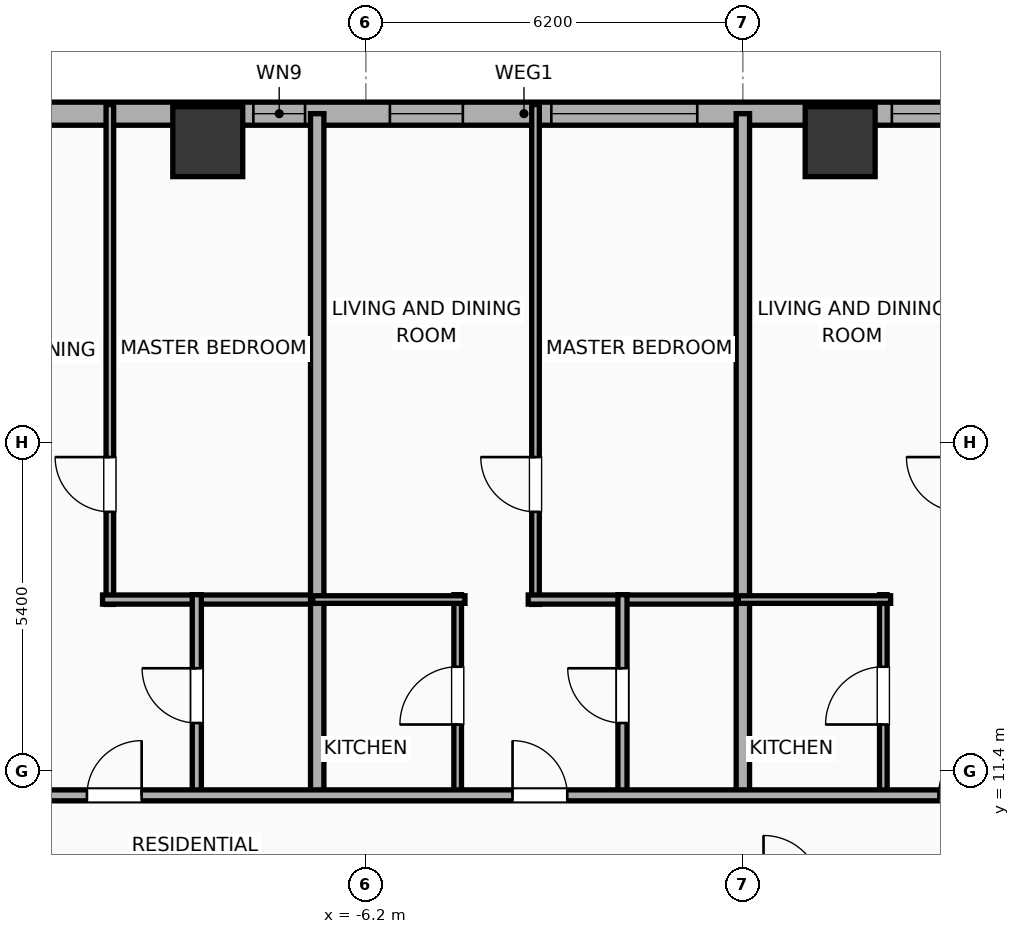
"""IFC4 building model, lengths in metres.
Left out: names, types, materials, properties, quantities, classifications, styles, units other than length and angle.
Written with IfcOpenShell. Run it as: python <this file> out.ifc"""

import sys

from ifc_helpers import new_model, si_unit, direction, frame, frame_2d, origin, origin_2d, place, context, subcontext, project, spatial, rectangle, hollow_rectangle, extrude, element, fill, save


model = new_model("IFC4")
c1 = context("Model", 3, precision=1e-05, world=origin(), true_north=direction((0.0, 1.0)))
c2 = subcontext(c1, "Body", "Model", "MODEL_VIEW")
j1 = project(units=[si_unit("LENGTHUNIT", "METRE"), si_unit("PLANEANGLEUNIT", "RADIAN")], contexts=[c1])
p1 = place(None, origin())
s1 = spatial("IfcSite", under=j1, at=p1, CompositionType="ELEMENT")
p2 = place(p1, origin())
s2 = spatial("IfcBuilding", under=s1, at=p2, CompositionType="ELEMENT")
p3 = place(p2, frame((0.0, 0.0, 65.0)))
s3 = spatial("IfcBuildingStorey", under=s2, at=p3, CompositionType="ELEMENT", Elevation=65.0)
for number, where, z_axis, x_axis in (
    (1, (1.6, 21.75, 0.0), (0.0, 0.0, 1.0), (1.0, 0.0, 0.0)),
    (2, (-8.8, 21.75, 0.0), (0.0, 0.0, 1.0), (1.0, 0.0, 0.0)),
):
    element("IfcColumn", number, at=place(p3, frame(where, z_axis=z_axis, x_axis=x_axis)), inside=s3, PredefinedType="COLUMN", context=c2, shape_type="SweptSolid", body=[
        extrude(hollow_rectangle(XDim=1.15, YDim=1.15, WallThickness=0.04, at=origin_2d()), origin(), (0.0, 0.0, 1.0), 3.9),
    ])
p4 = place(p3, frame((-29.581, 22.21, 0.0), z_axis=(0.0, 0.0, 1.0), x_axis=(1.0, 0.0, 0.0)))
e3 = element("IfcWall", 3, at=p4, inside=s3, PredefinedType="ELEMENTEDWALL", context=c2, shape_type="SweptSolid", body=[
    extrude(rectangle(XDim=51.963, YDim=0.38, at=frame_2d((25.981, 0.0))), origin(), (0.0, 0.0, 1.0), 3.65),
])
p5 = place(p4, frame((5.81, 0.0, 0.75)))
e4 = element("IfcOpeningElement", 4, at=p5, cuts=e3, PredefinedType="OPENING", context=c2, shape_type="SweptSolid", body=[
    extrude(rectangle(XDim=2.4, YDim=2.1, at=frame_2d((1.2, 1.05))), frame((0.0, 0.2, 0.0), z_axis=(0.0, -1.0, 0.0), x_axis=(1.0, 0.0, 0.0)), (0.0, 0.0, 1.0), 0.4),
])
p6 = place(p4, frame((26.431, 0.0, 0.75)))
e5 = element("IfcOpeningElement", 5, at=p6, cuts=e3, PredefinedType="OPENING", context=c2, shape_type="SweptSolid", body=[
    extrude(rectangle(XDim=2.4, YDim=2.1, at=frame_2d((1.2, 1.05))), frame((0.0, 0.2, 0.0), z_axis=(0.0, -1.0, 0.0), x_axis=(1.0, 0.0, 0.0)), (0.0, 0.0, 1.0), 0.4),
])
p7 = place(p4, frame((43.752, 0.0, 0.75)))
e6 = element("IfcOpeningElement", 6, at=p7, cuts=e3, PredefinedType="OPENING", context=c2, shape_type="SweptSolid", body=[
    extrude(rectangle(XDim=2.4, YDim=2.1, at=frame_2d((1.2, 1.05))), frame((0.0, 0.2, 0.0), z_axis=(0.0, -1.0, 0.0), x_axis=(1.0, 0.0, 0.0)), (0.0, 0.0, 1.0), 0.4),
])
p8 = place(p4, frame((1.163, 0.0, 0.75)))
e7 = element("IfcOpeningElement", 7, at=p8, cuts=e3, PredefinedType="OPENING", context=c2, shape_type="SweptSolid", body=[
    extrude(rectangle(XDim=1.2, YDim=2.05, at=frame_2d((0.6, 1.025))), frame((0.0, 0.2, 0.0), z_axis=(0.0, -1.0, 0.0), x_axis=(1.0, 0.0, 0.0)), (0.0, 0.0, 1.0), 0.4),
])
p9 = place(p4, frame((3.251, 0.0, 0.75)))
e8 = element("IfcOpeningElement", 8, at=p9, cuts=e3, PredefinedType="OPENING", context=c2, shape_type="SweptSolid", body=[
    extrude(rectangle(XDim=1.2, YDim=2.05, at=frame_2d((0.6, 1.025))), frame((0.0, 0.2, 0.0), z_axis=(0.0, -1.0, 0.0), x_axis=(1.0, 0.0, 0.0)), (0.0, 0.0, 1.0), 0.4),
])
p10 = place(p4, frame((11.745, 0.0, 0.75)))
e9 = element("IfcOpeningElement", 9, at=p10, cuts=e3, PredefinedType="OPENING", context=c2, shape_type="SweptSolid", body=[
    extrude(rectangle(XDim=1.2, YDim=2.05, at=frame_2d((0.6, 1.025))), frame((0.0, 0.2, 0.0), z_axis=(0.0, -1.0, 0.0), x_axis=(1.0, 0.0, 0.0)), (0.0, 0.0, 1.0), 0.4),
])
p11 = place(p4, frame((16.776, 0.0, 0.75)))
e10 = element("IfcOpeningElement", 10, at=p11, cuts=e3, PredefinedType="OPENING", context=c2, shape_type="SweptSolid", body=[
    extrude(rectangle(XDim=1.2, YDim=2.05, at=frame_2d((0.6, 1.025))), frame((0.0, 0.2, 0.0), z_axis=(0.0, -1.0, 0.0), x_axis=(1.0, 0.0, 0.0)), (0.0, 0.0, 1.0), 0.4),
])
p12 = place(p4, frame((21.531, 0.0, 0.75)))
e11 = element("IfcOpeningElement", 11, at=p12, cuts=e3, PredefinedType="OPENING", context=c2, shape_type="SweptSolid", body=[
    extrude(rectangle(XDim=0.85, YDim=2.05, at=frame_2d((0.425, 1.025))), frame((0.0, 0.2, 0.0), z_axis=(0.0, -1.0, 0.0), x_axis=(1.0, 0.0, 0.0)), (0.0, 0.0, 1.0), 0.4),
])
p13 = place(p4, frame((23.776, 0.0, 0.75)))
e12 = element("IfcOpeningElement", 12, at=p13, cuts=e3, PredefinedType="OPENING", context=c2, shape_type="SweptSolid", body=[
    extrude(rectangle(XDim=1.2, YDim=2.05, at=frame_2d((0.6, 1.025))), frame((0.0, 0.2, 0.0), z_axis=(0.0, -1.0, 0.0), x_axis=(1.0, 0.0, 0.0)), (0.0, 0.0, 1.0), 0.4),
])
p14 = place(p4, frame((32.031, 0.0, 0.75)))
e13 = element("IfcOpeningElement", 13, at=p14, cuts=e3, PredefinedType="OPENING", context=c2, shape_type="SweptSolid", body=[
    extrude(rectangle(XDim=0.85, YDim=2.05, at=frame_2d((0.425, 1.025))), frame((0.0, 0.2, 0.0), z_axis=(0.0, -1.0, 0.0), x_axis=(1.0, 0.0, 0.0)), (0.0, 0.0, 1.0), 0.4),
])
p15 = place(p4, frame((34.276, 0.0, 0.75)))
e14 = element("IfcOpeningElement", 14, at=p15, cuts=e3, PredefinedType="OPENING", context=c2, shape_type="SweptSolid", body=[
    extrude(rectangle(XDim=1.2, YDim=2.05, at=frame_2d((0.6, 1.025))), frame((0.0, 0.2, 0.0), z_axis=(0.0, -1.0, 0.0), x_axis=(1.0, 0.0, 0.0)), (0.0, 0.0, 1.0), 0.4),
])
p16 = place(p4, frame((37.776, 0.0, 0.75)))
e15 = element("IfcOpeningElement", 15, at=p16, cuts=e3, PredefinedType="OPENING", context=c2, shape_type="SweptSolid", body=[
    extrude(rectangle(XDim=1.2, YDim=2.05, at=frame_2d((0.6, 1.025))), frame((0.0, 0.2, 0.0), z_axis=(0.0, -1.0, 0.0), x_axis=(1.0, 0.0, 0.0)), (0.0, 0.0, 1.0), 0.4),
])
p17 = place(p4, frame((42.411, 0.0, 0.75)))
e16 = element("IfcOpeningElement", 16, at=p17, cuts=e3, PredefinedType="OPENING", context=c2, shape_type="SweptSolid", body=[
    extrude(rectangle(XDim=0.85, YDim=2.05, at=frame_2d((0.425, 1.025))), frame((0.0, 0.2, 0.0), z_axis=(0.0, -1.0, 0.0), x_axis=(1.0, 0.0, 0.0)), (0.0, 0.0, 1.0), 0.4),
])
p18 = place(p4, frame((47.791, 0.0, 0.75)))
e17 = element("IfcOpeningElement", 17, at=p18, cuts=e3, PredefinedType="OPENING", context=c2, shape_type="SweptSolid", body=[
    extrude(rectangle(XDim=1.2, YDim=2.05, at=frame_2d((0.6, 1.025))), frame((0.0, 0.2, 0.0), z_axis=(0.0, -1.0, 0.0), x_axis=(1.0, 0.0, 0.0)), (0.0, 0.0, 1.0), 0.4),
])
p19 = place(p4, frame((49.901, 0.0, 0.75)))
e18 = element("IfcOpeningElement", 18, at=p19, cuts=e3, PredefinedType="OPENING", context=c2, shape_type="SweptSolid", body=[
    extrude(rectangle(XDim=1.2, YDim=2.05, at=frame_2d((0.6, 1.025))), frame((0.0, 0.2, 0.0), z_axis=(0.0, -1.0, 0.0), x_axis=(1.0, 0.0, 0.0)), (0.0, 0.0, 1.0), 0.4),
])
p20 = place(p3, frame((-10.41, 14.14, 0.0), z_axis=(0.0, 0.0, 1.0), x_axis=(0.0, 1.0, 0.0)))
e19 = element("IfcWall", 19, at=p20, inside=s3, PredefinedType="PARTITIONING", context=c2, shape_type="SweptSolid", body=[
    extrude(rectangle(XDim=8.22, YDim=0.125, at=frame_2d((4.11, 0.0))), origin(), (0.0, 0.0, 1.0), 2.94),
])
p21 = place(p20, frame((1.523, 0.0, 0.0)))
e20 = element("IfcOpeningElement", 20, at=p21, cuts=e19, PredefinedType="OPENING", context=c2, shape_type="SweptSolid", body=[
    extrude(rectangle(XDim=0.9, YDim=2.05, at=frame_2d((0.45, 1.025))), frame((0.0, 0.073, 0.0), z_axis=(0.0, -1.0, 0.0), x_axis=(1.0, 0.0, 0.0)), (0.0, 0.0, 1.0), 0.145),
])
p22 = place(p3, frame((-10.53, 14.22, 0.0), z_axis=(0.0, 0.0, 1.0), x_axis=(1.0, 0.0, 0.0)))
e21 = element("IfcWall", 21, at=p22, inside=s3, PredefinedType="PLUMBINGWALL", context=c2, shape_type="SweptSolid", body=[
    extrude(rectangle(XDim=3.605, YDim=0.15, at=frame_2d((1.802, 0.0))), origin(), (0.0, 0.0, 1.0), 3.65),
])
p23 = place(p3, frame((-8.98, 10.98, 0.0), z_axis=(0.0, 0.0, 1.0), x_axis=(0.0, 1.0, 0.0)))
e22 = element("IfcWall", 22, at=p23, inside=s3, PredefinedType="PLUMBINGWALL", context=c2, shape_type="SweptSolid", body=[
    extrude(rectangle(XDim=3.32, YDim=0.15, at=frame_2d((1.66, 0.0))), origin(), (0.0, 0.0, 1.0), 3.65),
])
p24 = place(p23, frame((1.21, 0.0, 0.0)))
e23 = element("IfcOpeningElement", 23, at=p24, cuts=e22, PredefinedType="OPENING", context=c2, shape_type="SweptSolid", body=[
    extrude(rectangle(XDim=0.9, YDim=2.05, at=frame_2d((0.45, 1.025))), frame((0.0, 0.085, 0.0), z_axis=(0.0, -1.0, 0.0), x_axis=(1.0, 0.0, 0.0)), (0.0, 0.0, 1.0), 0.17),
])
p25 = place(p3, frame((-7.0, 10.92, 0.0), z_axis=(0.0, 0.0, 1.0), x_axis=(0.0, 1.0, 0.0)))
e24 = element("IfcWall", 24, at=p25, inside=s3, PredefinedType="PARTITIONING", context=c2, shape_type="SweptSolid", body=[
    extrude(rectangle(XDim=11.29, YDim=0.22, at=frame_2d((5.645, 0.0))), origin(), (0.0, 0.0, 1.0), 3.65),
])
p26 = place(p3, frame((-3.41, 14.14, 0.0), z_axis=(0.0, 0.0, 1.0), x_axis=(0.0, 1.0, 0.0)))
e25 = element("IfcWall", 25, at=p26, inside=s3, PredefinedType="PARTITIONING", context=c2, shape_type="SweptSolid", body=[
    extrude(rectangle(XDim=8.22, YDim=0.125, at=frame_2d((4.11, 0.0))), origin(), (0.0, 0.0, 1.0), 3.65),
])
p27 = place(p26, frame((1.523, 0.0, 0.0)))
e26 = element("IfcOpeningElement", 26, at=p27, cuts=e25, PredefinedType="OPENING", context=c2, shape_type="SweptSolid", body=[
    extrude(rectangle(XDim=0.9, YDim=2.05, at=frame_2d((0.45, 1.025))), frame((0.0, 0.073, 0.0), z_axis=(0.0, -1.0, 0.0), x_axis=(1.0, 0.0, 0.0)), (0.0, 0.0, 1.0), 0.145),
])
p28 = place(p3, frame((-3.53, 14.22, 0.0), z_axis=(0.0, 0.0, 1.0), x_axis=(1.0, 0.0, 0.0)))
e27 = element("IfcWall", 27, at=p28, inside=s3, PredefinedType="PLUMBINGWALL", context=c2, shape_type="SweptSolid", body=[
    extrude(rectangle(XDim=3.605, YDim=0.15, at=frame_2d((1.802, 0.0))), origin(), (0.0, 0.0, 1.0), 3.65),
])
p29 = place(p3, frame((-4.69, 10.98, 0.0), z_axis=(0.0, 0.0, 1.0), x_axis=(0.0, 1.0, 0.0)))
e28 = element("IfcWall", 28, at=p29, inside=s3, PredefinedType="PARTITIONING", context=c2, shape_type="SweptSolid", body=[
    extrude(rectangle(XDim=3.32, YDim=0.125, at=frame_2d((1.66, 0.0))), origin(), (0.0, 0.0, 1.0), 3.65),
])
p30 = place(p29, frame((1.185, 0.0, 0.0)))
e29 = element("IfcOpeningElement", 29, at=p30, cuts=e28, PredefinedType="OPENING", context=c2, shape_type="SweptSolid", body=[
    extrude(rectangle(XDim=0.95, YDim=2.05, at=frame_2d((0.475, 1.025))), frame((0.0, 0.073, 0.0), z_axis=(0.0, -1.0, 0.0), x_axis=(1.0, 0.0, 0.0)), (0.0, 0.0, 1.0), 0.145),
])
p31 = place(p3, frame((-7.075, 14.22, 0.0), z_axis=(0.0, 0.0, 1.0), x_axis=(1.0, 0.0, 0.0)))
e30 = element("IfcWall", 30, at=p31, inside=s3, PredefinedType="PARTITIONING", context=c2, shape_type="SweptSolid", body=[
    extrude(rectangle(XDim=2.505, YDim=0.125, at=frame_2d((1.252, 0.0))), origin(), (0.0, 0.0, 1.0), 3.65),
])
p32 = place(p3, frame((-1.98, 10.98, 0.0), z_axis=(0.0, 0.0, 1.0), x_axis=(0.0, 1.0, 0.0)))
e31 = element("IfcWall", 31, at=p32, inside=s3, PredefinedType="PLUMBINGWALL", context=c2, shape_type="SweptSolid", body=[
    extrude(rectangle(XDim=3.32, YDim=0.15, at=frame_2d((1.66, 0.0))), origin(), (0.0, 0.0, 1.0), 3.65),
])
p33 = place(p32, frame((1.21, 0.0, 0.0)))
e32 = element("IfcOpeningElement", 32, at=p33, cuts=e31, PredefinedType="OPENING", context=c2, shape_type="SweptSolid", body=[
    extrude(rectangle(XDim=0.9, YDim=2.05, at=frame_2d((0.45, 1.025))), frame((0.0, 0.085, 0.0), z_axis=(0.0, -1.0, 0.0), x_axis=(1.0, 0.0, 0.0)), (0.0, 0.0, 1.0), 0.17),
])
p34 = place(p3, frame((0.0, 10.92, 0.0), z_axis=(0.0, 0.0, 1.0), x_axis=(0.0, 1.0, 0.0)))
e33 = element("IfcWall", 33, at=p34, inside=s3, PredefinedType="PARTITIONING", context=c2, shape_type="SweptSolid", body=[
    extrude(rectangle(XDim=11.29, YDim=0.22, at=frame_2d((5.645, 0.0))), origin(), (0.0, 0.0, 1.0), 3.65),
])
p35 = place(p3, frame((2.31, 10.98, 0.0), z_axis=(0.0, 0.0, 1.0), x_axis=(0.0, 1.0, 0.0)))
e34 = element("IfcWall", 34, at=p35, inside=s3, PredefinedType="PARTITIONING", context=c2, shape_type="SweptSolid", body=[
    extrude(rectangle(XDim=3.32, YDim=0.125, at=frame_2d((1.66, 0.0))), origin(), (0.0, 0.0, 1.0), 3.65),
])
p36 = place(p35, frame((1.185, 0.0, 0.0)))
e35 = element("IfcOpeningElement", 35, at=p36, cuts=e34, PredefinedType="OPENING", context=c2, shape_type="SweptSolid", body=[
    extrude(rectangle(XDim=0.95, YDim=2.05, at=frame_2d((0.475, 1.025))), frame((0.0, 0.073, 0.0), z_axis=(0.0, -1.0, 0.0), x_axis=(1.0, 0.0, 0.0)), (0.0, 0.0, 1.0), 0.145),
])
p37 = place(p3, frame((-0.075, 14.22, 0.0), z_axis=(0.0, 0.0, 1.0), x_axis=(1.0, 0.0, 0.0)))
e36 = element("IfcWall", 36, at=p37, inside=s3, PredefinedType="PARTITIONING", context=c2, shape_type="SweptSolid", body=[
    extrude(rectangle(XDim=2.505, YDim=0.125, at=frame_2d((1.252, 0.0))), origin(), (0.0, 0.0, 1.0), 3.65),
])
p38 = place(p3, frame((-33.41, 11.0, 0.0), z_axis=(0.0, 0.0, 1.0), x_axis=(1.0, 0.0, 0.0)))
e37 = element("IfcWall", 37, at=p38, inside=s3, PredefinedType="PARTITIONING", context=c2, shape_type="SweptSolid", body=[
    extrude(rectangle(XDim=59.62, YDim=0.18, at=frame_2d((29.81, 0.0))), origin(), (0.0, 0.0, 1.0), 3.65),
])
p39 = place(p38, frame((2.913, 0.0, 0.0)))
e38 = element("IfcOpeningElement", 38, at=p39, cuts=e37, PredefinedType="OPENING", context=c2, shape_type="SweptSolid", body=[
    extrude(rectangle(XDim=0.9, YDim=2.05, at=frame_2d((0.45, 1.025))), frame((0.0, 0.1, 0.0), z_axis=(0.0, -1.0, 0.0), x_axis=(1.0, 0.0, 0.0)), (0.0, 0.0, 1.0), 0.2),
])
p40 = place(p38, frame((10.312, 0.0, 0.0)))
e39 = element("IfcOpeningElement", 39, at=p40, cuts=e37, PredefinedType="OPENING", context=c2, shape_type="SweptSolid", body=[
    extrude(rectangle(XDim=1.15, YDim=2.05, at=frame_2d((0.575, 1.025))), frame((0.0, 0.1, 0.0), z_axis=(0.0, -1.0, 0.0), x_axis=(1.0, 0.0, 0.0)), (0.0, 0.0, 1.0), 0.2),
])
p41 = place(p38, frame((15.85, 0.0, 0.0)))
e40 = element("IfcOpeningElement", 40, at=p41, cuts=e37, PredefinedType="OPENING", context=c2, shape_type="SweptSolid", body=[
    extrude(rectangle(XDim=0.9, YDim=2.05, at=frame_2d((0.45, 1.025))), frame((0.0, 0.1, 0.0), z_axis=(0.0, -1.0, 0.0), x_axis=(1.0, 0.0, 0.0)), (0.0, 0.0, 1.0), 0.2),
])
p42 = place(p38, frame((22.623, 0.0, 0.0)))
e41 = element("IfcOpeningElement", 41, at=p42, cuts=e37, PredefinedType="OPENING", context=c2, shape_type="SweptSolid", body=[
    extrude(rectangle(XDim=0.9, YDim=2.05, at=frame_2d((0.45, 1.025))), frame((0.0, 0.1, 0.0), z_axis=(0.0, -1.0, 0.0), x_axis=(1.0, 0.0, 0.0)), (0.0, 0.0, 1.0), 0.2),
])
p43 = place(p38, frame((29.622, 0.0, 0.0)))
e42 = element("IfcOpeningElement", 42, at=p43, cuts=e37, PredefinedType="OPENING", context=c2, shape_type="SweptSolid", body=[
    extrude(rectangle(XDim=0.9, YDim=2.05, at=frame_2d((0.45, 1.025))), frame((0.0, 0.1, 0.0), z_axis=(0.0, -1.0, 0.0), x_axis=(1.0, 0.0, 0.0)), (0.0, 0.0, 1.0), 0.2),
])
p44 = place(p38, frame((36.628, 0.0, 0.0)))
e43 = element("IfcOpeningElement", 43, at=p44, cuts=e37, PredefinedType="OPENING", context=c2, shape_type="SweptSolid", body=[
    extrude(rectangle(XDim=0.9, YDim=2.05, at=frame_2d((0.45, 1.025))), frame((0.0, 0.1, 0.0), z_axis=(0.0, -1.0, 0.0), x_axis=(1.0, 0.0, 0.0)), (0.0, 0.0, 1.0), 0.2),
])
p45 = place(p38, frame((43.627, 0.0, 0.0)))
e44 = element("IfcOpeningElement", 44, at=p45, cuts=e37, PredefinedType="OPENING", context=c2, shape_type="SweptSolid", body=[
    extrude(rectangle(XDim=0.9, YDim=2.05, at=frame_2d((0.45, 1.025))), frame((0.0, 0.1, 0.0), z_axis=(0.0, -1.0, 0.0), x_axis=(1.0, 0.0, 0.0)), (0.0, 0.0, 1.0), 0.2),
])
p46 = place(p38, frame((48.617, 0.0, 0.0)))
e45 = element("IfcOpeningElement", 45, at=p46, cuts=e37, PredefinedType="OPENING", context=c2, shape_type="SweptSolid", body=[
    extrude(rectangle(XDim=1.15, YDim=2.05, at=frame_2d((0.575, 1.025))), frame((0.0, 0.1, 0.0), z_axis=(0.0, -1.0, 0.0), x_axis=(1.0, 0.0, 0.0)), (0.0, 0.0, 1.0), 0.2),
])
p47 = place(p38, frame((56.272, 0.0, 0.0)))
e46 = element("IfcOpeningElement", 46, at=p47, cuts=e37, PredefinedType="OPENING", context=c2, shape_type="SweptSolid", body=[
    extrude(rectangle(XDim=0.9, YDim=2.05, at=frame_2d((0.45, 1.025))), frame((0.0, 0.1, 0.0), z_axis=(0.0, -1.0, 0.0), x_axis=(1.0, 0.0, 0.0)), (0.0, 0.0, 1.0), 0.2),
])
p48 = place(p6, origin())
e47 = element("IfcWindow", 47, at=p48, inside=s3, PartitioningType="SINGLE_PANEL", PredefinedType="WINDOW", context=c2, shape_type="SweptSolid", body=[
    extrude(rectangle(XDim=2.4, YDim=2.1, at=frame_2d((1.2, 1.05))), frame((0.0, 0.03, 0.0), z_axis=(0.0, -1.0, 0.0), x_axis=(1.0, 0.0, 0.0)), (0.0, 0.0, 1.0), 0.06),
])
fill(e5, e47)
p49 = place(p12, origin())
e48 = element("IfcWindow", 48, at=p49, inside=s3, PartitioningType="SINGLE_PANEL", PredefinedType="WINDOW", context=c2, shape_type="SweptSolid", body=[
    extrude(rectangle(XDim=0.85, YDim=2.05, at=frame_2d((0.425, 1.025))), frame((0.0, 0.03, 0.0), z_axis=(0.0, -1.0, 0.0), x_axis=(1.0, 0.0, 0.0)), (0.0, 0.0, 1.0), 0.06),
])
fill(e11, e48)
p50 = place(p13, origin())
e49 = element("IfcWindow", 49, at=p50, inside=s3, PartitioningType="SINGLE_PANEL", PredefinedType="WINDOW", context=c2, shape_type="SweptSolid", body=[
    extrude(rectangle(XDim=1.2, YDim=2.05, at=frame_2d((0.6, 1.025))), frame((0.0, 0.03, 0.0), z_axis=(0.0, -1.0, 0.0), x_axis=(1.0, 0.0, 0.0)), (0.0, 0.0, 1.0), 0.06),
])
fill(e12, e49)
p51 = place(p14, origin())
e50 = element("IfcWindow", 50, at=p51, inside=s3, PartitioningType="SINGLE_PANEL", PredefinedType="WINDOW", context=c2, shape_type="SweptSolid", body=[
    extrude(rectangle(XDim=0.85, YDim=2.05, at=frame_2d((0.425, 1.025))), frame((0.0, 0.03, 0.0), z_axis=(0.0, -1.0, 0.0), x_axis=(1.0, 0.0, 0.0)), (0.0, 0.0, 1.0), 0.06),
])
fill(e13, e50)
p52 = place(p21, origin())
e51 = element("IfcDoor", 51, at=p52, inside=s3, OperationType="SINGLE_SWING_RIGHT", PredefinedType="DOOR", context=c2, shape_type="SweptSolid", body=[
    extrude(rectangle(XDim=0.9, YDim=2.05, at=frame_2d((0.45, 1.025))), frame((0.0, 0.025, 0.0), z_axis=(0.0, -1.0, 0.0), x_axis=(1.0, 0.0, 0.0)), (0.0, 0.0, 1.0), 0.05),
])
fill(e20, e51)
p53 = place(p24, origin())
e52 = element("IfcDoor", 52, at=p53, inside=s3, OperationType="SINGLE_SWING_RIGHT", PredefinedType="DOOR", context=c2, shape_type="SweptSolid", body=[
    extrude(rectangle(XDim=0.9, YDim=2.05, at=frame_2d((0.45, 1.025))), frame((0.0, 0.025, 0.0), z_axis=(0.0, -1.0, 0.0), x_axis=(1.0, 0.0, 0.0)), (0.0, 0.0, 1.0), 0.05),
])
fill(e23, e52)
p54 = place(p27, origin())
e53 = element("IfcDoor", 53, at=p54, inside=s3, OperationType="SINGLE_SWING_RIGHT", PredefinedType="DOOR", context=c2, shape_type="SweptSolid", body=[
    extrude(rectangle(XDim=0.9, YDim=2.05, at=frame_2d((0.45, 1.025))), frame((0.0, 0.025, 0.0), z_axis=(0.0, -1.0, 0.0), x_axis=(1.0, 0.0, 0.0)), (0.0, 0.0, 1.0), 0.05),
])
fill(e26, e53)
p55 = place(p30, origin())
e54 = element("IfcDoor", 54, at=p55, inside=s3, OperationType="SINGLE_SWING_LEFT", PredefinedType="DOOR", context=c2, shape_type="SweptSolid", body=[
    extrude(rectangle(XDim=0.95, YDim=2.05, at=frame_2d((0.475, 1.025))), frame((0.0, 0.025, 0.0), z_axis=(0.0, -1.0, 0.0), x_axis=(1.0, 0.0, 0.0)), (0.0, 0.0, 1.0), 0.05),
])
fill(e29, e54)
p56 = place(p33, origin())
e55 = element("IfcDoor", 55, at=p56, inside=s3, OperationType="SINGLE_SWING_RIGHT", PredefinedType="DOOR", context=c2, shape_type="SweptSolid", body=[
    extrude(rectangle(XDim=0.9, YDim=2.05, at=frame_2d((0.45, 1.025))), frame((0.0, 0.025, 0.0), z_axis=(0.0, -1.0, 0.0), x_axis=(1.0, 0.0, 0.0)), (0.0, 0.0, 1.0), 0.05),
])
fill(e32, e55)
p57 = place(p36, origin())
e56 = element("IfcDoor", 56, at=p57, inside=s3, OperationType="SINGLE_SWING_LEFT", PredefinedType="DOOR", context=c2, shape_type="SweptSolid", body=[
    extrude(rectangle(XDim=0.95, YDim=2.05, at=frame_2d((0.475, 1.025))), frame((0.0, 0.025, 0.0), z_axis=(0.0, -1.0, 0.0), x_axis=(1.0, 0.0, 0.0)), (0.0, 0.0, 1.0), 0.05),
])
fill(e35, e56)
p58 = place(p42, origin())
e57 = element("IfcDoor", 57, at=p58, inside=s3, OperationType="SINGLE_SWING_RIGHT", PredefinedType="DOOR", context=c2, shape_type="SweptSolid", body=[
    extrude(rectangle(XDim=0.9, YDim=2.05, at=frame_2d((0.45, 1.025))), frame((0.0, 0.025, 0.0), z_axis=(0.0, -1.0, 0.0), x_axis=(1.0, 0.0, 0.0)), (0.0, 0.0, 1.0), 0.05),
])
fill(e41, e57)
p59 = place(p43, origin())
e58 = element("IfcDoor", 58, at=p59, inside=s3, OperationType="SINGLE_SWING_LEFT", PredefinedType="DOOR", context=c2, shape_type="SweptSolid", body=[
    extrude(rectangle(XDim=0.9, YDim=2.05, at=frame_2d((0.45, 1.025))), frame((0.0, 0.025, 0.0), z_axis=(0.0, -1.0, 0.0), x_axis=(1.0, 0.0, 0.0)), (0.0, 0.0, 1.0), 0.05),
])
fill(e42, e58)
p60 = place(p44, origin())
e59 = element("IfcDoor", 59, at=p60, inside=s3, OperationType="SINGLE_SWING_RIGHT", PredefinedType="DOOR", context=c2, shape_type="SweptSolid", body=[
    extrude(rectangle(XDim=0.9, YDim=2.05, at=frame_2d((0.45, 1.025))), frame((0.0, 0.025, 0.0), z_axis=(0.0, -1.0, 0.0), x_axis=(1.0, 0.0, 0.0)), (0.0, 0.0, 1.0), 0.05),
])
fill(e43, e59)
save(model, sys.argv[1])
